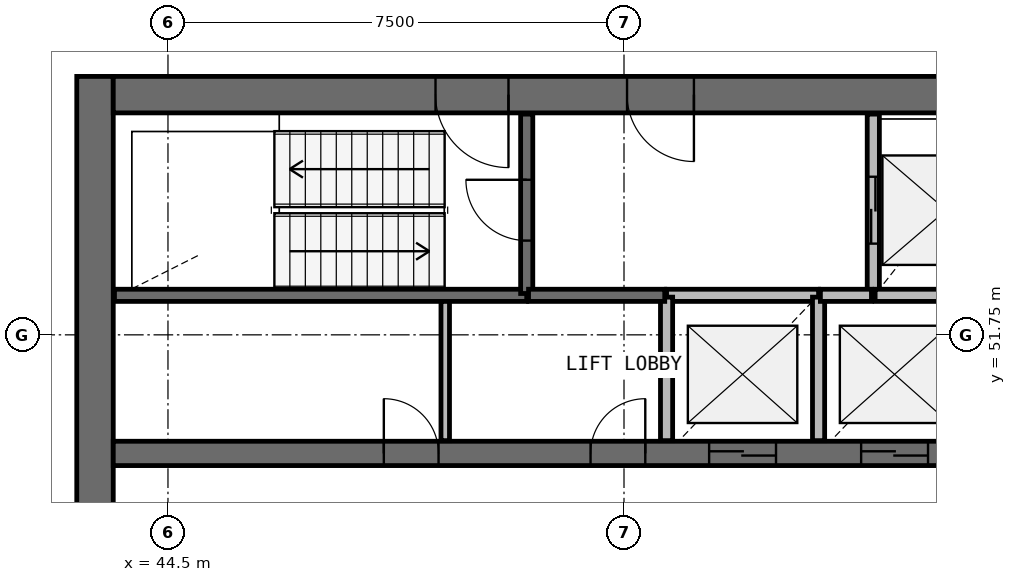
"""IFC4 building model, lengths in metres.
Left out: names, types, materials, properties, quantities, classifications, styles, units other than length and angle.
Written with IfcOpenShell. Run it as: python <this file> out.ifc"""

import sys

from ifc_helpers import new_model, si_unit, direction, frame, frame_2d, origin, place, context, subcontext, project, spatial, rectangle, extrude, source, transform, mapped, element, fill, save


model = new_model("IFC4")
c1 = context("Model", 3, precision=1e-05, world=origin(), true_north=direction((0.0, 1.0)))
c2 = subcontext(c1, "Body", "Model", "MODEL_VIEW")
j1 = project(units=[si_unit("LENGTHUNIT", "METRE"), si_unit("PLANEANGLEUNIT", "RADIAN")], contexts=[c1])
p1 = place(None, origin())
s1 = spatial("IfcSite", under=j1, at=p1, CompositionType="ELEMENT")
p2 = place(p1, origin())
s2 = spatial("IfcBuilding", under=s1, at=p2, CompositionType="ELEMENT")
p3 = place(p2, frame((0.0, 0.0, 183.8)))
s3 = spatial("IfcBuildingStorey", under=s2, at=p3, CompositionType="ELEMENT", Elevation=183.8)
p4 = place(p3, frame((43.3, 56.0, 0.0), z_axis=(0.0, 0.0, 1.0), x_axis=(0.0, -1.0, 0.0)))
e1 = element("IfcWall", 1, at=p4, inside=s3, PredefinedType="SHEAR", context=c2, shape_type="SweptSolid", body=[
    extrude(rectangle(XDim=16.0, YDim=0.6, at=frame_2d((8.0, 0.0))), origin(), (0.0, 0.0, 1.0), 3.9),
])
p5 = place(p4, frame((7.1, 0.0, 0.0)))
e2 = element("IfcOpeningElement", 2, at=p5, cuts=e1, PredefinedType="OPENING", context=c2, shape_type="SweptSolid", body=[
    extrude(rectangle(XDim=1.8, YDim=2.1, at=frame_2d((0.9, 1.05))), frame((0.0, 0.31, 0.0), z_axis=(0.0, -1.0, 0.0), x_axis=(1.0, 0.0, 0.0)), (0.0, 0.0, 1.0), 0.62),
])
p6 = place(p3, frame((60.4, 55.7, 0.0), z_axis=(0.0, 0.0, 1.0), x_axis=(-1.0, 0.0, 0.0)))
e3 = element("IfcWall", 3, at=p6, inside=s3, PredefinedType="SHEAR", context=c2, shape_type="SweptSolid", body=[
    extrude(rectangle(XDim=16.8, YDim=0.6, at=frame_2d((8.4, 0.0))), origin(), (0.0, 0.0, 1.0), 3.9),
])
p7 = place(p6, frame((0.4, 0.0, 0.0)))
e4 = element("IfcOpeningElement", 4, at=p7, cuts=e3, PredefinedType="OPENING", context=c2, shape_type="SweptSolid", body=[
    extrude(rectangle(XDim=1.1, YDim=2.1, at=frame_2d((0.55, 1.05))), frame((0.0, 0.31, 0.0), z_axis=(0.0, -1.0, 0.0), x_axis=(1.0, 0.0, 0.0)), (0.0, 0.0, 1.0), 0.62),
])
p8 = place(p6, frame((10.3, 0.0, 0.0)))
e5 = element("IfcOpeningElement", 5, at=p8, cuts=e3, PredefinedType="OPENING", context=c2, shape_type="SweptSolid", body=[
    extrude(rectangle(XDim=1.2, YDim=2.1, at=frame_2d((0.6, 1.05))), frame((0.0, 0.31, 0.0), z_axis=(0.0, -1.0, 0.0), x_axis=(1.0, 0.0, 0.0)), (0.0, 0.0, 1.0), 0.62),
])
p9 = place(p6, frame((7.25, 0.0, 0.0)))
e6 = element("IfcOpeningElement", 6, at=p9, cuts=e3, PredefinedType="OPENING", context=c2, shape_type="SweptSolid", body=[
    extrude(rectangle(XDim=1.1, YDim=2.1, at=frame_2d((0.55, 1.05))), frame((0.0, 0.31, 0.0), z_axis=(0.0, -1.0, 0.0), x_axis=(1.0, 0.0, 0.0)), (0.0, 0.0, 1.0), 0.62),
])
p10 = place(p3, frame((43.6, 49.8, 0.0), z_axis=(0.0, 0.0, 1.0), x_axis=(1.0, 0.0, 0.0)))
e7 = element("IfcWall", 7, at=p10, inside=s3, PredefinedType="SHEAR", context=c2, shape_type="SweptSolid", body=[
    extrude(rectangle(XDim=16.8, YDim=0.4, at=frame_2d((8.4, 0.0))), origin(), (0.0, 0.0, 1.0), 3.9),
])
p11 = place(p10, frame((9.8, 0.0, 0.0)))
e8 = element("IfcOpeningElement", 8, at=p11, cuts=e7, PredefinedType="OPENING", context=c2, shape_type="SweptSolid", body=[
    extrude(rectangle(XDim=1.1, YDim=2.1, at=frame_2d((0.55, 1.05))), frame((0.0, 0.21, 0.0), z_axis=(0.0, -1.0, 0.0), x_axis=(1.0, 0.0, 0.0)), (0.0, 0.0, 1.0), 0.42),
])
p12 = place(p10, frame((12.3, 0.0, 0.0)))
e9 = element("IfcOpeningElement", 9, at=p12, cuts=e7, PredefinedType="OPENING", context=c2, shape_type="SweptSolid", body=[
    extrude(rectangle(XDim=1.1, YDim=2.1, at=frame_2d((0.55, 1.05))), frame((0.0, 0.21, 0.0), z_axis=(0.0, -1.0, 0.0), x_axis=(1.0, 0.0, 0.0)), (0.0, 0.0, 1.0), 0.42),
])
p13 = place(p10, frame((14.8, 0.0, 0.0)))
e10 = element("IfcOpeningElement", 10, at=p13, cuts=e7, PredefinedType="OPENING", context=c2, shape_type="SweptSolid", body=[
    extrude(rectangle(XDim=1.1, YDim=2.1, at=frame_2d((0.55, 1.05))), frame((0.0, 0.21, 0.0), z_axis=(0.0, -1.0, 0.0), x_axis=(1.0, 0.0, 0.0)), (0.0, 0.0, 1.0), 0.42),
])
p14 = place(p10, frame((4.45, 0.0, 0.0)))
e11 = element("IfcOpeningElement", 11, at=p14, cuts=e7, PredefinedType="OPENING", context=c2, shape_type="SweptSolid", body=[
    extrude(rectangle(XDim=0.9, YDim=2.1, at=frame_2d((0.45, 1.05))), frame((0.0, 0.21, 0.0), z_axis=(0.0, -1.0, 0.0), x_axis=(1.0, 0.0, 0.0)), (0.0, 0.0, 1.0), 0.42),
])
p15 = place(p10, frame((7.85, 0.0, 0.0)))
e12 = element("IfcOpeningElement", 12, at=p15, cuts=e7, PredefinedType="OPENING", context=c2, shape_type="SweptSolid", body=[
    extrude(rectangle(XDim=0.9, YDim=2.1, at=frame_2d((0.45, 1.05))), frame((0.0, 0.21, 0.0), z_axis=(0.0, -1.0, 0.0), x_axis=(1.0, 0.0, 0.0)), (0.0, 0.0, 1.0), 0.42),
])
p16 = place(p3, frame((43.62, 52.4, 0.0), z_axis=(0.0, 0.0, 1.0), x_axis=(1.0, 0.0, 0.0)))
e13 = element("IfcWall", 13, at=p16, inside=s3, PredefinedType="SOLIDWALL", context=c2, shape_type="SweptSolid", body=[
    extrude(rectangle(XDim=6.78, YDim=0.2, at=frame_2d((3.39, 0.0))), origin(), (0.0, 0.0, 1.0), 3.58),
])
p17 = place(p3, frame((50.4, 52.43, 0.0), z_axis=(0.0, 0.0, 1.0), x_axis=(0.0, 1.0, 0.0)))
e14 = element("IfcWall", 14, at=p17, inside=s3, PredefinedType="SOLIDWALL", context=c2, shape_type="SweptSolid", body=[
    extrude(rectangle(XDim=2.95, YDim=0.2, at=frame_2d((1.475, 0.0))), origin(), (0.0, 0.0, 1.0), 3.58),
])
p18 = place(p17, frame((0.87, 0.0, 0.0)))
e15 = element("IfcOpeningElement", 15, at=p18, cuts=e14, PredefinedType="OPENING", context=c2, shape_type="SweptSolid", body=[
    extrude(rectangle(XDim=1.0, YDim=2.1, at=frame_2d((0.5, 1.05))), frame((0.0, 0.11, 0.0), z_axis=(0.0, -1.0, 0.0), x_axis=(1.0, 0.0, 0.0)), (0.0, 0.0, 1.0), 0.22),
])
p19 = place(p3, frame((56.1, 55.38, 0.0), z_axis=(0.0, 0.0, 1.0), x_axis=(0.0, -1.0, 0.0)))
e16 = element("IfcWall", 16, at=p19, inside=s3, PredefinedType="SOLIDWALL", context=c2, shape_type="SweptSolid", body=[
    extrude(rectangle(XDim=2.98, YDim=0.2, at=frame_2d((1.49, 0.0))), origin(), (0.0, 0.0, 1.0), 3.58),
])
p20 = place(p19, frame((1.03, 0.0, 0.0)))
e17 = element("IfcOpeningElement", 17, at=p20, cuts=e16, PredefinedType="OPENING", context=c2, shape_type="SweptSolid", body=[
    extrude(rectangle(XDim=1.1, YDim=2.1, at=frame_2d((0.55, 1.05))), frame((0.0, 0.11, 0.0), z_axis=(0.0, -1.0, 0.0), x_axis=(1.0, 0.0, 0.0)), (0.0, 0.0, 1.0), 0.22),
])
p21 = place(p3, frame((55.2, 52.4, 0.0), z_axis=(0.0, 0.0, 1.0), x_axis=(-1.0, 0.0, 0.0)))
e18 = element("IfcWall", 18, at=p21, inside=s3, PredefinedType="SOLIDWALL", context=c2, shape_type="SweptSolid", body=[
    extrude(rectangle(XDim=2.5, YDim=0.2, at=frame_2d((1.25, 0.0))), origin(), (0.0, 0.0, 1.0), 3.58),
])
for number, where, z_axis, x_axis in (
    (19, (52.7, 52.37, 0.0), (0.0, 0.0, 1.0), (0.0, -1.0, 0.0)),
    (20, (55.2, 50.01, 0.0), (0.0, 0.0, 1.0), (0.0, 1.0, 0.0)),
):
    element("IfcWall", number, at=place(p3, frame(where, z_axis=z_axis, x_axis=x_axis)), inside=s3, PredefinedType="SOLIDWALL", context=c2, shape_type="SweptSolid", body=[
        extrude(rectangle(XDim=2.36, YDim=0.2, at=frame_2d((1.18, 0.0))), origin(), (0.0, 0.0, 1.0), 3.58),
    ])
p22 = place(p3, frame((50.43, 52.4, 0.0), z_axis=(0.0, 0.0, 1.0), x_axis=(1.0, 0.0, 0.0)))
e21 = element("IfcWall", 21, at=p22, inside=s3, PredefinedType="SOLIDWALL", context=c2, shape_type="SweptSolid", body=[
    extrude(rectangle(XDim=2.24, YDim=0.2, at=frame_2d((1.12, 0.0))), origin(), (0.0, 0.0, 1.0), 3.58),
])
p23 = place(p3, frame((57.67, 52.4, 0.0), z_axis=(0.0, 0.0, 1.0), x_axis=(-1.0, 0.0, 0.0)))
e22 = element("IfcWall", 22, at=p23, inside=s3, PredefinedType="SOLIDWALL", context=c2, shape_type="SweptSolid", body=[
    extrude(rectangle(XDim=1.54, YDim=0.2, at=frame_2d((0.77, 0.0))), origin(), (0.0, 0.0, 1.0), 3.58),
])
p24 = place(p3, frame((56.07, 52.4, 0.0), z_axis=(0.0, 0.0, 1.0), x_axis=(-1.0, 0.0, 0.0)))
e23 = element("IfcWall", 23, at=p24, inside=s3, PredefinedType="SOLIDWALL", context=c2, shape_type="SweptSolid", body=[
    extrude(rectangle(XDim=0.84, YDim=0.2, at=frame_2d((0.42, 0.0))), origin(), (0.0, 0.0, 1.0), 3.58),
])
p25 = place(p3, frame((49.06, 50.01, 0.0), z_axis=(0.0, 0.0, 1.0), x_axis=(0.0, 1.0, 0.0)))
e24 = element("IfcWall", 24, at=p25, inside=s3, PredefinedType="PARTITIONING", context=c2, shape_type="SweptSolid", body=[
    extrude(rectangle(XDim=2.29, YDim=0.14, at=frame_2d((1.145, 0.0))), origin(), (0.0, 0.0, 1.0), 2.88),
])
m1 = source(origin(), c2, "Body", "SweptSolid", [
    extrude(rectangle(XDim=1.1, YDim=2.1, at=frame_2d((0.55, 1.05))), frame((0.0, 0.025, 0.0), z_axis=(0.0, -1.0, 0.0), x_axis=(1.0, 0.0, 0.0)), (0.0, 0.0, 1.0), 0.05),
])
p26 = place(p11, origin())
e25 = element("IfcDoor", 25, at=p26, inside=s3, OperationType="DOUBLE_DOOR_SLIDING", PredefinedType="USERDEFINED", context=c2, shape_type="MappedRepresentation", body=[
    mapped(m1, transform((0.0, 0.0, 0.0), scale=1.0)),
])
fill(e8, e25)
p27 = place(p12, origin())
e26 = element("IfcDoor", 26, at=p27, inside=s3, OperationType="DOUBLE_DOOR_SLIDING", PredefinedType="USERDEFINED", context=c2, shape_type="MappedRepresentation", body=[
    mapped(m1, transform((0.0, 0.0, 0.0), scale=1.0)),
])
fill(e9, e26)
p28 = place(p20, origin())
e27 = element("IfcDoor", 27, at=p28, inside=s3, OperationType="DOUBLE_DOOR_SLIDING", PredefinedType="USERDEFINED", context=c2, shape_type="MappedRepresentation", body=[
    mapped(m1, transform((0.0, 0.0, 0.0), scale=1.0)),
])
fill(e17, e27)
m2 = source(origin(), c2, "Body", "SweptSolid", [
    extrude(rectangle(XDim=1.2, YDim=2.1, at=frame_2d((0.6, 1.05))), frame((0.0, 0.025, 0.0), z_axis=(0.0, -1.0, 0.0), x_axis=(1.0, 0.0, 0.0)), (0.0, 0.0, 1.0), 0.05),
])
p29 = place(p8, origin())
e28 = element("IfcDoor", 28, at=p29, inside=s3, OperationType="SINGLE_SWING_LEFT", PredefinedType="DOOR", context=c2, shape_type="MappedRepresentation", body=[
    mapped(m2, transform((0.0, 0.0, 0.0), scale=1.0)),
])
fill(e5, e28)
m3 = source(origin(), c2, "Body", "SweptSolid", [
    extrude(rectangle(XDim=1.0, YDim=2.1, at=frame_2d((0.5, 1.05))), frame((0.0, 0.025, 0.0), z_axis=(0.0, -1.0, 0.0), x_axis=(1.0, 0.0, 0.0)), (0.0, 0.0, 1.0), 0.05),
])
p30 = place(p18, origin())
e29 = element("IfcDoor", 29, at=p30, inside=s3, OperationType="SINGLE_SWING_RIGHT", PredefinedType="DOOR", context=c2, shape_type="MappedRepresentation", body=[
    mapped(m3, transform((0.0, 0.0, 0.0), scale=1.0)),
])
fill(e15, e29)
m4 = source(origin(), c2, "Body", "SweptSolid", [
    extrude(rectangle(XDim=1.1, YDim=2.1, at=frame_2d((0.55, 1.05))), frame((0.0, 0.025, 0.0), z_axis=(0.0, -1.0, 0.0), x_axis=(1.0, 0.0, 0.0)), (0.0, 0.0, 1.0), 0.05),
])
p31 = place(p9, origin())
e30 = element("IfcDoor", 30, at=p31, inside=s3, OperationType="SINGLE_SWING_LEFT", PredefinedType="DOOR", context=c2, shape_type="MappedRepresentation", body=[
    mapped(m4, transform((0.0, 0.0, 0.0), scale=1.0)),
])
fill(e6, e30)
m5 = source(origin(), c2, "Body", "SweptSolid", [
    extrude(rectangle(XDim=0.9, YDim=2.1, at=frame_2d((0.45, 1.05))), frame((0.0, 0.025, 0.0), z_axis=(0.0, -1.0, 0.0), x_axis=(1.0, 0.0, 0.0)), (0.0, 0.0, 1.0), 0.05),
])
p32 = place(p14, origin())
e31 = element("IfcDoor", 31, at=p32, inside=s3, OperationType="SINGLE_SWING_LEFT", PredefinedType="DOOR", context=c2, shape_type="MappedRepresentation", body=[
    mapped(m5, transform((0.0, 0.0, 0.0), scale=1.0)),
])
fill(e11, e31)
p33 = place(p15, origin())
e32 = element("IfcDoor", 32, at=p33, inside=s3, OperationType="SINGLE_SWING_RIGHT", PredefinedType="DOOR", context=c2, shape_type="MappedRepresentation", body=[
    mapped(m5, transform((0.0, 0.0, 0.0), scale=1.0)),
])
fill(e12, e32)
save(model, sys.argv[1])
